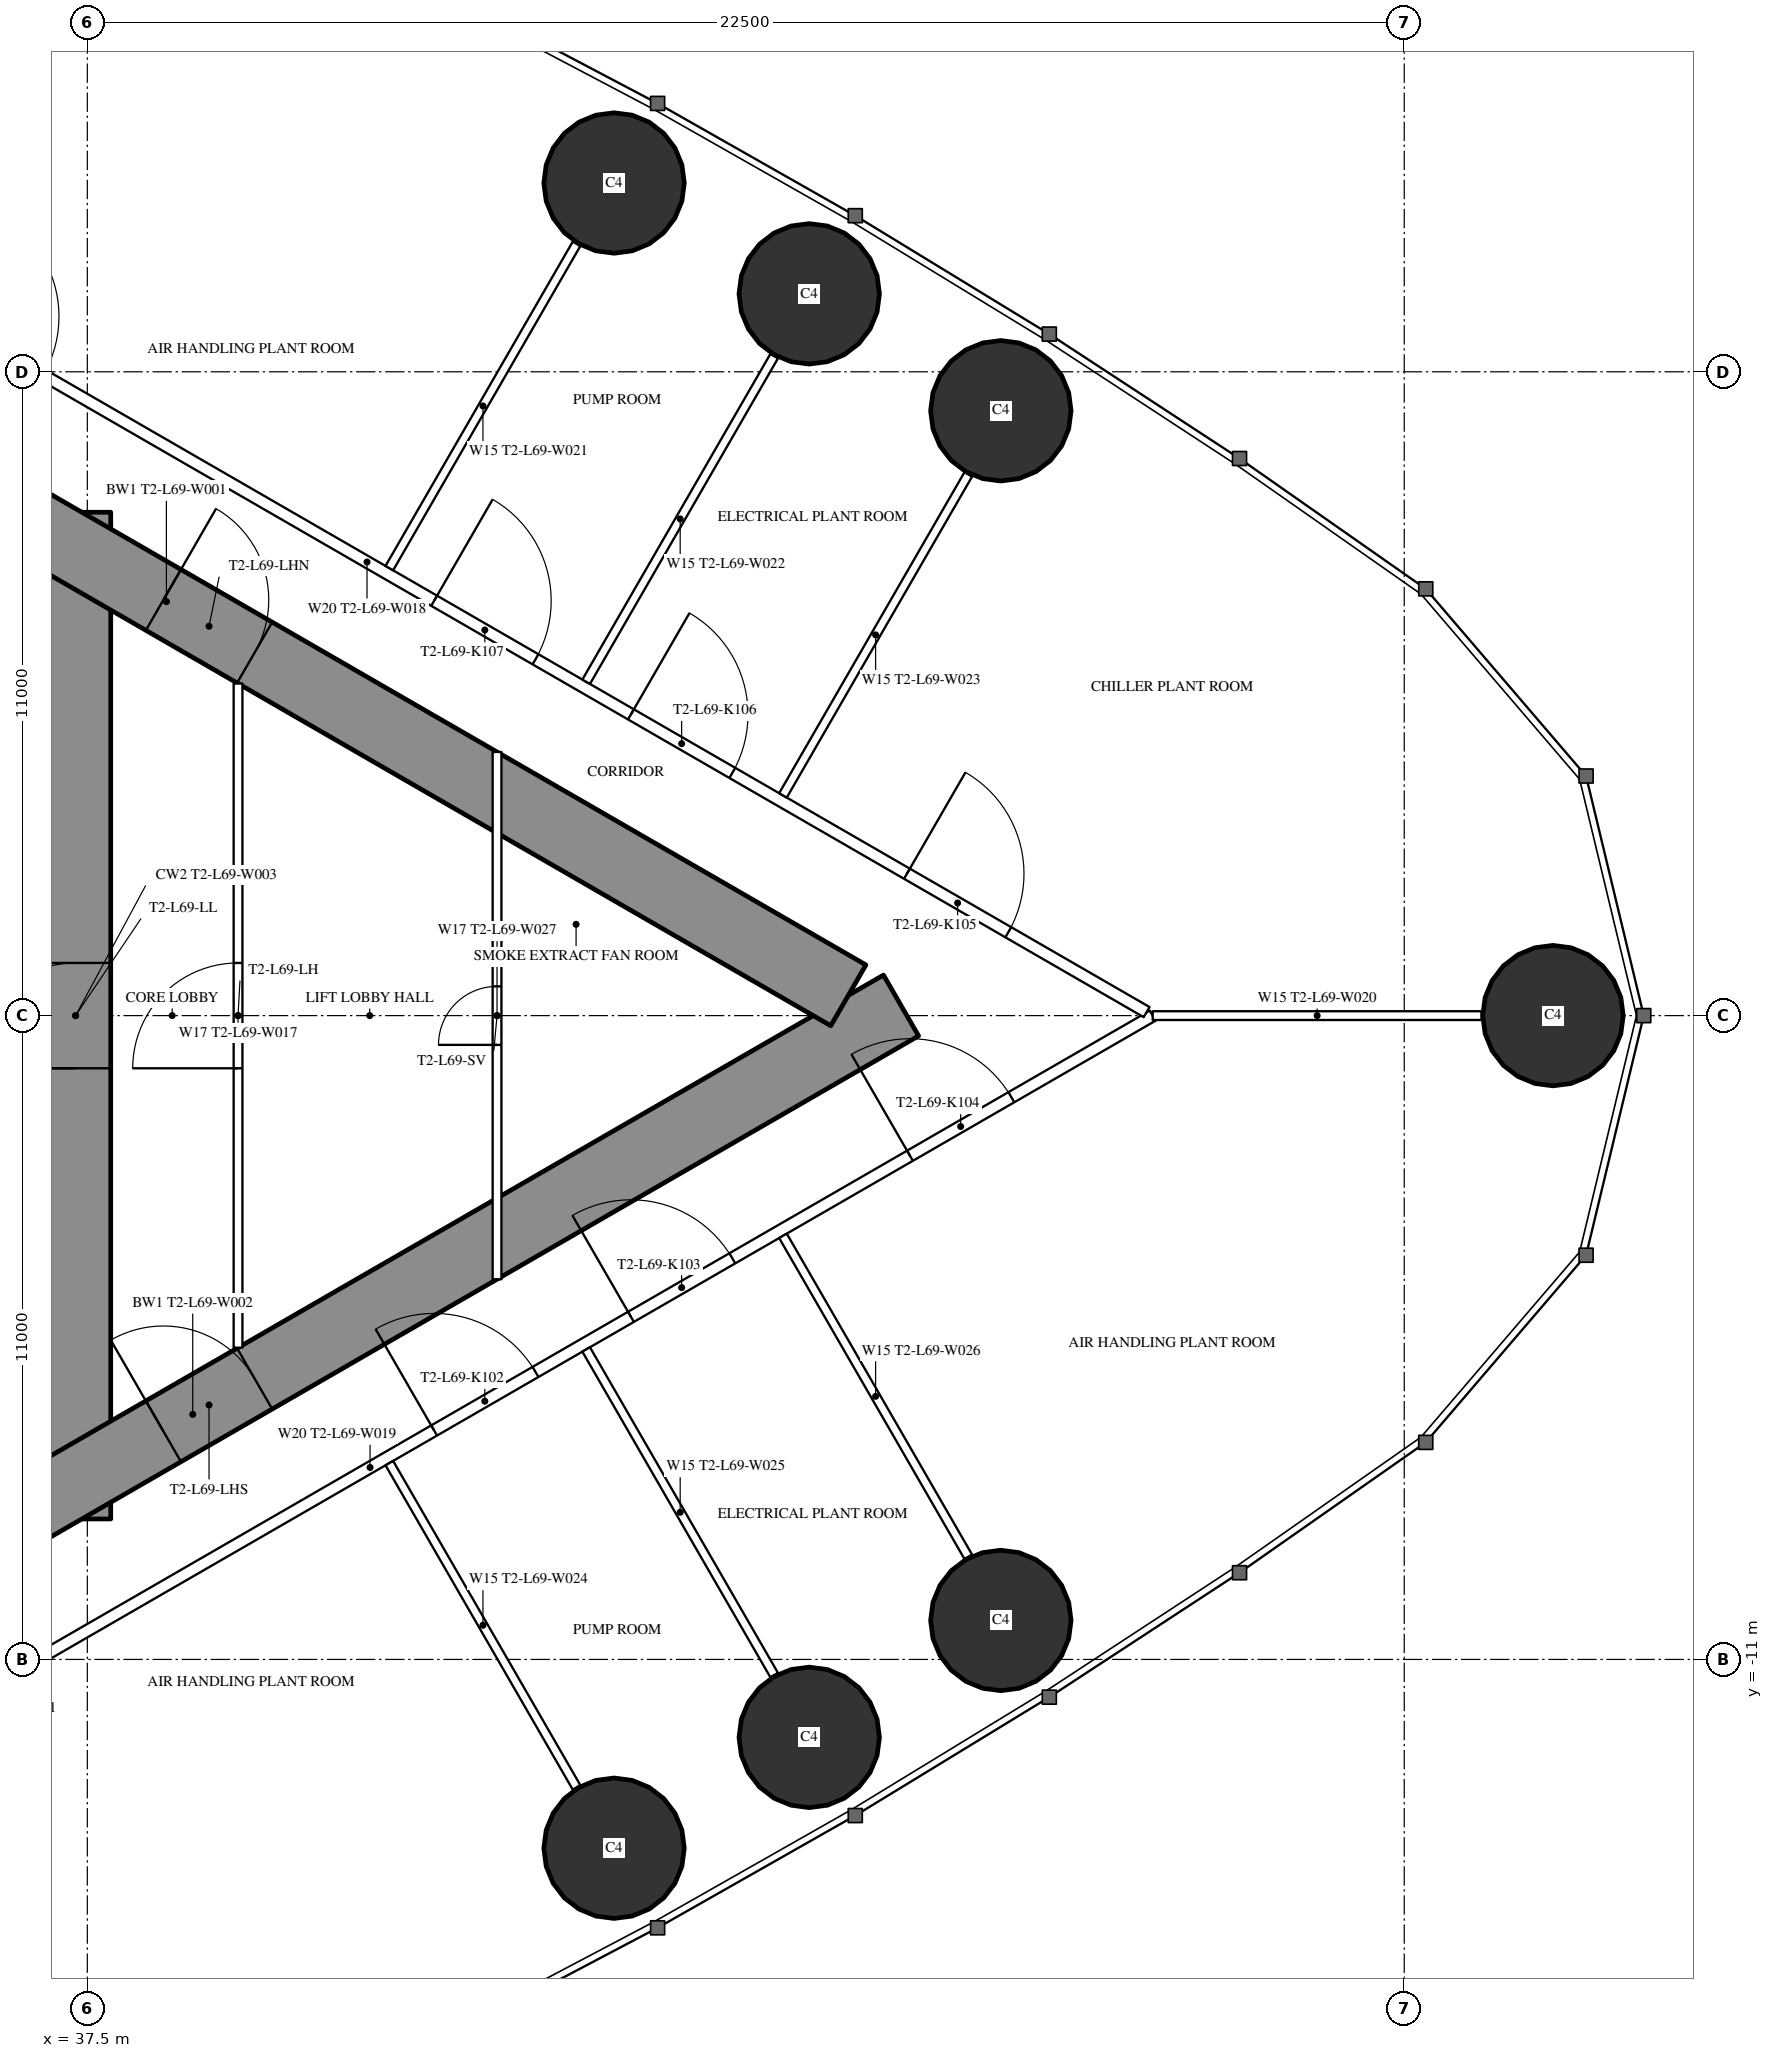
"""IFC4 building model, lengths in metres.
Left out: names, types, materials, properties, quantities, classifications, styles, units other than length and angle.
Written with IfcOpenShell. Run it as: python <this file> out.ifc"""

import sys

from ifc_helpers import new_model, si_unit, direction, frame, frame_2d, origin, origin_2d, place, context, subcontext, project, spatial, rectangle, circle, extrude, element, fill, save


model = new_model("IFC4")
c1 = context("Model", 3, precision=1e-05, world=origin(), true_north=direction((0.0, 1.0)))
c2 = subcontext(c1, "Body", "Model", "MODEL_VIEW")
j1 = project(units=[si_unit("LENGTHUNIT", "METRE"), si_unit("PLANEANGLEUNIT", "RADIAN")], contexts=[c1])
p1 = place(None, origin())
s1 = spatial("IfcSite", under=j1, at=p1, CompositionType="ELEMENT")
p2 = place(p1, origin())
s2 = spatial("IfcBuilding", under=s1, at=p2, CompositionType="ELEMENT")
p3 = place(p2, frame((0.0, 0.0, 263.3)))
s3 = spatial("IfcBuildingStorey", under=s2, at=p3, CompositionType="ELEMENT", Elevation=263.3)
for number, where, z_axis, x_axis in (
    (1, (62.542, 0.0, 0.0), (0.0, 0.0, 1.0), (1.0, 0.0, 0.0)),
    (2, (53.108, 10.334, 0.0), (0.0, 0.0, 1.0), (1.0, 0.0, 0.0)),
    (3, (49.834, 12.332, 0.0), (0.0, 0.0, 1.0), (1.0, 0.0, 0.0)),
    (4, (46.499, 14.226, 0.0), (0.0, 0.0, 1.0), (1.0, 0.0, 0.0)),
    (5, (46.499, -14.226, 0.0), (0.0, 0.0, 1.0), (1.0, 0.0, 0.0)),
    (6, (49.834, -12.332, 0.0), (0.0, 0.0, 1.0), (1.0, 0.0, 0.0)),
    (7, (53.108, -10.334, 0.0), (0.0, 0.0, 1.0), (1.0, 0.0, 0.0)),
):
    element("IfcColumn", number, at=place(p3, frame(where, z_axis=z_axis, x_axis=x_axis)), inside=s3, PredefinedType="COLUMN", context=c2, shape_type="SweptSolid", body=[
        extrude(circle(Radius=1.2, at=origin_2d()), origin(), (0.0, 0.0, 1.0), 5.0),
    ])
p4 = place(p3, frame((37.3, -8.6, 0.0), z_axis=(0.0, 0.0, 1.0), x_axis=(0.0, 1.0, 0.0)))
e8 = element("IfcWall", 8, at=p4, inside=s3, PredefinedType="SHEAR", context=c2, shape_type="SweptSolid", body=[
    extrude(rectangle(XDim=17.2, YDim=1.2, at=frame_2d((8.6, 0.0))), origin(), (0.0, 0.0, 1.0), 5.0),
])
p5 = place(p4, frame((7.7, 0.0, 0.0)))
e9 = element("IfcOpeningElement", 9, at=p5, cuts=e8, PredefinedType="OPENING", context=c2, shape_type="SweptSolid", body=[
    extrude(rectangle(XDim=1.8, YDim=2.2, at=frame_2d((0.9, 1.1))), frame((0.0, 0.61, 0.0), z_axis=(0.0, -1.0, 0.0), x_axis=(1.0, 0.0, 0.0)), (0.0, 0.0, 1.0), 1.22),
])
p6 = place(p3, frame((27.2, -13.8, 0.0), z_axis=(0.0, 0.0, 1.0), x_axis=(0.866027159892, 0.499996958321, 0.0)))
e10 = element("IfcWall", 10, at=p6, inside=s3, PredefinedType="SHEAR", context=c2, shape_type="SweptSolid", body=[
    extrude(rectangle(XDim=27.947, YDim=1.2, at=frame_2d((13.973, 0.0))), origin(), (0.0, 0.0, 1.0), 5.0),
])
p7 = place(p6, frame((4.6, 0.0, 0.0)))
e11 = element("IfcOpeningElement", 11, at=p7, cuts=e10, PredefinedType="OPENING", context=c2, shape_type="SweptSolid", body=[
    extrude(rectangle(XDim=1.0, YDim=2.2, at=frame_2d((0.5, 1.1))), frame((0.0, 0.61, 0.0), z_axis=(0.0, -1.0, 0.0), x_axis=(1.0, 0.0, 0.0)), (0.0, 0.0, 1.0), 1.22),
])
p8 = place(p6, frame((13.395, 0.0, 0.0)))
e12 = element("IfcOpeningElement", 12, at=p8, cuts=e10, PredefinedType="OPENING", context=c2, shape_type="SweptSolid", body=[
    extrude(rectangle(XDim=1.8, YDim=2.2, at=frame_2d((0.9, 1.1))), frame((0.0, 0.61, 0.0), z_axis=(0.0, -1.0, 0.0), x_axis=(1.0, 0.0, 0.0)), (0.0, 0.0, 1.0), 1.22),
])
p9 = place(p3, frame((27.2, 13.8, 0.0), z_axis=(0.0, 0.0, 1.0), x_axis=(0.866024515034, -0.500001539357, 0.0)))
e13 = element("IfcWall", 13, at=p9, inside=s3, PredefinedType="SHEAR", context=c2, shape_type="SweptSolid", body=[
    extrude(rectangle(XDim=26.907, YDim=1.2, at=frame_2d((13.454, 0.0))), origin(), (0.0, 0.0, 1.0), 5.0),
])
p10 = place(p9, frame((4.6, 0.0, 0.0)))
e14 = element("IfcOpeningElement", 14, at=p10, cuts=e13, PredefinedType="OPENING", context=c2, shape_type="SweptSolid", body=[
    extrude(rectangle(XDim=1.0, YDim=2.2, at=frame_2d((0.5, 1.1))), frame((0.0, 0.61, 0.0), z_axis=(0.0, -1.0, 0.0), x_axis=(1.0, 0.0, 0.0)), (0.0, 0.0, 1.0), 1.22),
])
p11 = place(p9, frame((13.395, 0.0, 0.0)))
e15 = element("IfcOpeningElement", 15, at=p11, cuts=e13, PredefinedType="OPENING", context=c2, shape_type="SweptSolid", body=[
    extrude(rectangle(XDim=1.8, YDim=2.2, at=frame_2d((0.9, 1.1))), frame((0.0, 0.61, 0.0), z_axis=(0.0, -1.0, 0.0), x_axis=(1.0, 0.0, 0.0)), (0.0, 0.0, 1.0), 1.22),
])
p12 = place(p3, frame((28.959, -15.44, 0.0), z_axis=(0.0, 0.0, 1.0), x_axis=(0.866025227435, 0.500000305447, 0.0)))
e16 = element("IfcWall", 16, at=p12, inside=s3, PredefinedType="PARTITIONING", context=c2, shape_type="SweptSolid", body=[
    extrude(rectangle(XDim=30.88, YDim=0.2, at=frame_2d((15.44, 0.0))), origin(), (0.0, 0.0, 1.0), 4.75),
])
p13 = place(p12, frame((6.994, 0.0, 0.0)))
e17 = element("IfcOpeningElement", 17, at=p13, cuts=e16, PredefinedType="OPENING", context=c2, shape_type="SweptSolid", body=[
    extrude(rectangle(XDim=2.0, YDim=2.4, at=frame_2d((1.0, 1.2))), frame((0.0, 0.11, 0.0), z_axis=(0.0, -1.0, 0.0), x_axis=(1.0, 0.0, 0.0)), (0.0, 0.0, 1.0), 0.22),
])
p14 = place(p12, frame((16.704, 0.0, 0.0)))
e18 = element("IfcOpeningElement", 18, at=p14, cuts=e16, PredefinedType="OPENING", context=c2, shape_type="SweptSolid", body=[
    extrude(rectangle(XDim=2.0, YDim=2.4, at=frame_2d((1.0, 1.2))), frame((0.0, 0.11, 0.0), z_axis=(0.0, -1.0, 0.0), x_axis=(1.0, 0.0, 0.0)), (0.0, 0.0, 1.0), 0.22),
])
p15 = place(p12, frame((20.587, 0.0, 0.0)))
e19 = element("IfcOpeningElement", 19, at=p15, cuts=e16, PredefinedType="OPENING", context=c2, shape_type="SweptSolid", body=[
    extrude(rectangle(XDim=2.0, YDim=2.4, at=frame_2d((1.0, 1.2))), frame((0.0, 0.11, 0.0), z_axis=(0.0, -1.0, 0.0), x_axis=(1.0, 0.0, 0.0)), (0.0, 0.0, 1.0), 0.22),
])
p16 = place(p12, frame((26.092, 0.0, 0.0)))
e20 = element("IfcOpeningElement", 20, at=p16, cuts=e16, PredefinedType="OPENING", context=c2, shape_type="SweptSolid", body=[
    extrude(rectangle(XDim=2.0, YDim=2.4, at=frame_2d((1.0, 1.2))), frame((0.0, 0.11, 0.0), z_axis=(0.0, -1.0, 0.0), x_axis=(1.0, 0.0, 0.0)), (0.0, 0.0, 1.0), 0.22),
])
p17 = place(p3, frame((28.959, 15.44, 0.0), z_axis=(0.0, 0.0, 1.0), x_axis=(0.866027378611, -0.499996579484, 0.0)))
e21 = element("IfcWall", 21, at=p17, inside=s3, PredefinedType="PARTITIONING", context=c2, shape_type="SweptSolid", body=[
    extrude(rectangle(XDim=30.76, YDim=0.2, at=frame_2d((15.38, 0.0))), origin(), (0.0, 0.0, 1.0), 4.75),
])
p18 = place(p17, frame((26.032, 0.0, 0.0)))
e22 = element("IfcOpeningElement", 22, at=p18, cuts=e21, PredefinedType="OPENING", context=c2, shape_type="SweptSolid", body=[
    extrude(rectangle(XDim=2.0, YDim=2.4, at=frame_2d((1.0, 1.2))), frame((0.0, 0.11, 0.0), z_axis=(0.0, -1.0, 0.0), x_axis=(1.0, 0.0, 0.0)), (0.0, 0.0, 1.0), 0.22),
])
p19 = place(p17, frame((20.587, 0.0, 0.0)))
e23 = element("IfcOpeningElement", 23, at=p19, cuts=e21, PredefinedType="OPENING", context=c2, shape_type="SweptSolid", body=[
    extrude(rectangle(XDim=2.0, YDim=2.4, at=frame_2d((1.0, 1.2))), frame((0.0, 0.11, 0.0), z_axis=(0.0, -1.0, 0.0), x_axis=(1.0, 0.0, 0.0)), (0.0, 0.0, 1.0), 0.22),
])
p20 = place(p17, frame((16.704, 0.0, 0.0)))
e24 = element("IfcOpeningElement", 24, at=p20, cuts=e21, PredefinedType="OPENING", context=c2, shape_type="SweptSolid", body=[
    extrude(rectangle(XDim=2.0, YDim=2.4, at=frame_2d((1.0, 1.2))), frame((0.0, 0.11, 0.0), z_axis=(0.0, -1.0, 0.0), x_axis=(1.0, 0.0, 0.0)), (0.0, 0.0, 1.0), 0.22),
])
p21 = place(p17, frame((6.994, 0.0, 0.0)))
e25 = element("IfcOpeningElement", 25, at=p21, cuts=e21, PredefinedType="OPENING", context=c2, shape_type="SweptSolid", body=[
    extrude(rectangle(XDim=2.0, YDim=2.4, at=frame_2d((1.0, 1.2))), frame((0.0, 0.11, 0.0), z_axis=(0.0, -1.0, 0.0), x_axis=(1.0, 0.0, 0.0)), (0.0, 0.0, 1.0), 0.22),
])
p22 = place(p3, frame((42.66, -7.646, 0.0), z_axis=(0.0, 0.0, 1.0), x_axis=(0.499996592859, -0.866027370889, 0.0)))
e26 = element("IfcWall", 26, at=p22, inside=s3, PredefinedType="PARTITIONING", context=c2, shape_type="SweptSolid", body=[
    extrude(rectangle(XDim=6.398, YDim=0.15, at=frame_2d((3.199, 0.0))), origin(), (0.0, 0.0, 1.0), 3.85),
])
p23 = place(p3, frame((46.023, -5.704, 0.0), z_axis=(0.0, 0.0, 1.0), x_axis=(0.499984478165, -0.866034365135, 0.0)))
e27 = element("IfcWall", 27, at=p23, inside=s3, PredefinedType="PARTITIONING", context=c2, shape_type="SweptSolid", body=[
    extrude(rectangle(XDim=6.426, YDim=0.15, at=frame_2d((3.213, 0.0))), origin(), (0.0, 0.0, 1.0), 3.85),
])
p24 = place(p3, frame((49.385, -3.763, 0.0), z_axis=(0.0, 0.0, 1.0), x_axis=(0.499999447814, -0.866025722589, 0.0)))
e28 = element("IfcWall", 28, at=p24, inside=s3, PredefinedType="PARTITIONING", context=c2, shape_type="SweptSolid", body=[
    extrude(rectangle(XDim=6.333, YDim=0.15, at=frame_2d((3.166, 0.0))), origin(), (0.0, 0.0, 1.0), 3.85),
])
p25 = place(p3, frame((42.66, 7.646, 0.0), z_axis=(0.0, 0.0, 1.0), x_axis=(0.499996592859, 0.866027370889, 0.0)))
e29 = element("IfcWall", 29, at=p25, inside=s3, PredefinedType="PARTITIONING", context=c2, shape_type="SweptSolid", body=[
    extrude(rectangle(XDim=6.398, YDim=0.15, at=frame_2d((3.199, 0.0))), origin(), (0.0, 0.0, 1.0), 3.85),
])
p26 = place(p3, frame((46.023, 5.704, 0.0), z_axis=(0.0, 0.0, 1.0), x_axis=(0.499984478165, 0.866034365135, 0.0)))
e30 = element("IfcWall", 30, at=p26, inside=s3, PredefinedType="PARTITIONING", context=c2, shape_type="SweptSolid", body=[
    extrude(rectangle(XDim=6.426, YDim=0.15, at=frame_2d((3.213, 0.0))), origin(), (0.0, 0.0, 1.0), 3.85),
])
p27 = place(p3, frame((49.385, 3.763, 0.0), z_axis=(0.0, 0.0, 1.0), x_axis=(0.499999447814, 0.866025722589, 0.0)))
e31 = element("IfcWall", 31, at=p27, inside=s3, PredefinedType="PARTITIONING", context=c2, shape_type="SweptSolid", body=[
    extrude(rectangle(XDim=6.333, YDim=0.15, at=frame_2d((3.166, 0.0))), origin(), (0.0, 0.0, 1.0), 3.85),
])
p28 = place(p3, frame((55.702, 0.0, 0.0), z_axis=(0.0, 0.0, 1.0), x_axis=(1.0, 0.0, 0.0)))
e32 = element("IfcWall", 32, at=p28, inside=s3, PredefinedType="PARTITIONING", context=c2, shape_type="SweptSolid", body=[
    extrude(rectangle(XDim=5.619, YDim=0.15, at=frame_2d((2.81, 0.0))), origin(), (0.0, 0.0, 1.0), 3.85),
])
p29 = place(p3, frame((40.075, -5.674, 0.0), z_axis=(0.0, 0.0, 1.0), x_axis=(0.0, 1.0, 0.0)))
e33 = element("IfcWall", 33, at=p29, inside=s3, PredefinedType="PARTITIONING", context=c2, shape_type="SweptSolid", body=[
    extrude(rectangle(XDim=11.348, YDim=0.15, at=frame_2d((5.674, 0.0))), origin(), (0.0, 0.0, 1.0), 4.75),
])
p30 = place(p29, frame((4.774, 0.0, 0.0)))
e34 = element("IfcOpeningElement", 34, at=p30, cuts=e33, PredefinedType="OPENING", context=c2, shape_type="SweptSolid", body=[
    extrude(rectangle(XDim=1.8, YDim=2.2, at=frame_2d((0.9, 1.1))), frame((0.0, 0.085, 0.0), z_axis=(0.0, -1.0, 0.0), x_axis=(1.0, 0.0, 0.0)), (0.0, 0.0, 1.0), 0.17),
])
p31 = place(p3, frame((44.5, -4.505, 0.0), z_axis=(0.0, 0.0, 1.0), x_axis=(0.0, 1.0, 0.0)))
e35 = element("IfcWall", 35, at=p31, inside=s3, PredefinedType="PARTITIONING", context=c2, shape_type="SweptSolid", body=[
    extrude(rectangle(XDim=9.009, YDim=0.15, at=frame_2d((4.505, 0.0))), origin(), (0.0, 0.0, 1.0), 4.75),
])
p32 = place(p31, frame((4.005, 0.0, 0.0)))
e36 = element("IfcOpeningElement", 36, at=p32, cuts=e35, PredefinedType="OPENING", context=c2, shape_type="SweptSolid", body=[
    extrude(rectangle(XDim=1.0, YDim=2.2, at=frame_2d((0.5, 1.1))), frame((0.0, 0.085, 0.0), z_axis=(0.0, -1.0, 0.0), x_axis=(1.0, 0.0, 0.0)), (0.0, 0.0, 1.0), 0.17),
])
p33 = place(p14, origin())
e37 = element("IfcDoor", 37, at=p33, inside=s3, OperationType="DOUBLE_DOOR_SINGLE_SWING", PredefinedType="DOOR", context=c2, shape_type="SweptSolid", body=[
    extrude(rectangle(XDim=2.0, YDim=2.4, at=frame_2d((1.0, 1.2))), frame((0.0, 0.025, 0.0), z_axis=(0.0, -1.0, 0.0), x_axis=(1.0, 0.0, 0.0)), (0.0, 0.0, 1.0), 0.05),
])
fill(e18, e37)
p34 = place(p15, origin())
e38 = element("IfcDoor", 38, at=p34, inside=s3, OperationType="DOUBLE_DOOR_SINGLE_SWING", PredefinedType="DOOR", context=c2, shape_type="SweptSolid", body=[
    extrude(rectangle(XDim=2.0, YDim=2.4, at=frame_2d((1.0, 1.2))), frame((0.0, 0.025, 0.0), z_axis=(0.0, -1.0, 0.0), x_axis=(1.0, 0.0, 0.0)), (0.0, 0.0, 1.0), 0.05),
])
fill(e19, e38)
p35 = place(p16, origin())
e39 = element("IfcDoor", 39, at=p35, inside=s3, OperationType="DOUBLE_DOOR_SINGLE_SWING", PredefinedType="DOOR", context=c2, shape_type="SweptSolid", body=[
    extrude(rectangle(XDim=2.0, YDim=2.4, at=frame_2d((1.0, 1.2))), frame((0.0, 0.025, 0.0), z_axis=(0.0, -1.0, 0.0), x_axis=(1.0, 0.0, 0.0)), (0.0, 0.0, 1.0), 0.05),
])
fill(e20, e39)
p36 = place(p18, origin())
e40 = element("IfcDoor", 40, at=p36, inside=s3, OperationType="DOUBLE_DOOR_SINGLE_SWING", PredefinedType="DOOR", context=c2, shape_type="SweptSolid", body=[
    extrude(rectangle(XDim=2.0, YDim=2.4, at=frame_2d((1.0, 1.2))), frame((0.0, 0.025, 0.0), z_axis=(0.0, -1.0, 0.0), x_axis=(1.0, 0.0, 0.0)), (0.0, 0.0, 1.0), 0.05),
])
fill(e22, e40)
p37 = place(p19, origin())
e41 = element("IfcDoor", 41, at=p37, inside=s3, OperationType="DOUBLE_DOOR_SINGLE_SWING", PredefinedType="DOOR", context=c2, shape_type="SweptSolid", body=[
    extrude(rectangle(XDim=2.0, YDim=2.4, at=frame_2d((1.0, 1.2))), frame((0.0, 0.025, 0.0), z_axis=(0.0, -1.0, 0.0), x_axis=(1.0, 0.0, 0.0)), (0.0, 0.0, 1.0), 0.05),
])
fill(e23, e41)
p38 = place(p20, origin())
e42 = element("IfcDoor", 42, at=p38, inside=s3, OperationType="DOUBLE_DOOR_SINGLE_SWING", PredefinedType="DOOR", context=c2, shape_type="SweptSolid", body=[
    extrude(rectangle(XDim=2.0, YDim=2.4, at=frame_2d((1.0, 1.2))), frame((0.0, 0.025, 0.0), z_axis=(0.0, -1.0, 0.0), x_axis=(1.0, 0.0, 0.0)), (0.0, 0.0, 1.0), 0.05),
])
fill(e24, e42)
p39 = place(p30, origin())
e43 = element("IfcDoor", 43, at=p39, inside=s3, OperationType="DOUBLE_DOOR_SINGLE_SWING", PredefinedType="DOOR", context=c2, shape_type="SweptSolid", body=[
    extrude(rectangle(XDim=1.8, YDim=2.2, at=frame_2d((0.9, 1.1))), frame((0.0, 0.025, 0.0), z_axis=(0.0, -1.0, 0.0), x_axis=(1.0, 0.0, 0.0)), (0.0, 0.0, 1.0), 0.05),
])
fill(e34, e43)
p40 = place(p32, origin())
e44 = element("IfcDoor", 44, at=p40, inside=s3, OperationType="SINGLE_SWING_LEFT", PredefinedType="DOOR", context=c2, shape_type="SweptSolid", body=[
    extrude(rectangle(XDim=1.0, YDim=2.2, at=frame_2d((0.5, 1.1))), frame((0.0, 0.025, 0.0), z_axis=(0.0, -1.0, 0.0), x_axis=(1.0, 0.0, 0.0)), (0.0, 0.0, 1.0), 0.05),
])
fill(e36, e44)
p41 = place(p8, origin())
e45 = element("IfcDoor", 45, at=p41, inside=s3, OperationType="DOUBLE_DOOR_SINGLE_SWING", PredefinedType="DOOR", context=c2, shape_type="SweptSolid", body=[
    extrude(rectangle(XDim=1.8, YDim=2.2, at=frame_2d((0.9, 1.1))), frame((0.0, 0.025, 0.0), z_axis=(0.0, -1.0, 0.0), x_axis=(1.0, 0.0, 0.0)), (0.0, 0.0, 1.0), 0.05),
])
fill(e12, e45)
p42 = place(p11, origin())
e46 = element("IfcDoor", 46, at=p42, inside=s3, OperationType="DOUBLE_DOOR_SINGLE_SWING", PredefinedType="DOOR", context=c2, shape_type="SweptSolid", body=[
    extrude(rectangle(XDim=1.8, YDim=2.2, at=frame_2d((0.9, 1.1))), frame((0.0, 0.025, 0.0), z_axis=(0.0, -1.0, 0.0), x_axis=(1.0, 0.0, 0.0)), (0.0, 0.0, 1.0), 0.05),
])
fill(e15, e46)
p43 = place(p5, origin())
e47 = element("IfcDoor", 47, at=p43, inside=s3, OperationType="DOUBLE_DOOR_SINGLE_SWING", PredefinedType="DOOR", context=c2, shape_type="SweptSolid", body=[
    extrude(rectangle(XDim=1.8, YDim=2.2, at=frame_2d((0.9, 1.1))), frame((0.0, 0.025, 0.0), z_axis=(0.0, -1.0, 0.0), x_axis=(1.0, 0.0, 0.0)), (0.0, 0.0, 1.0), 0.05),
])
fill(e9, e47)
save(model, sys.argv[1])
